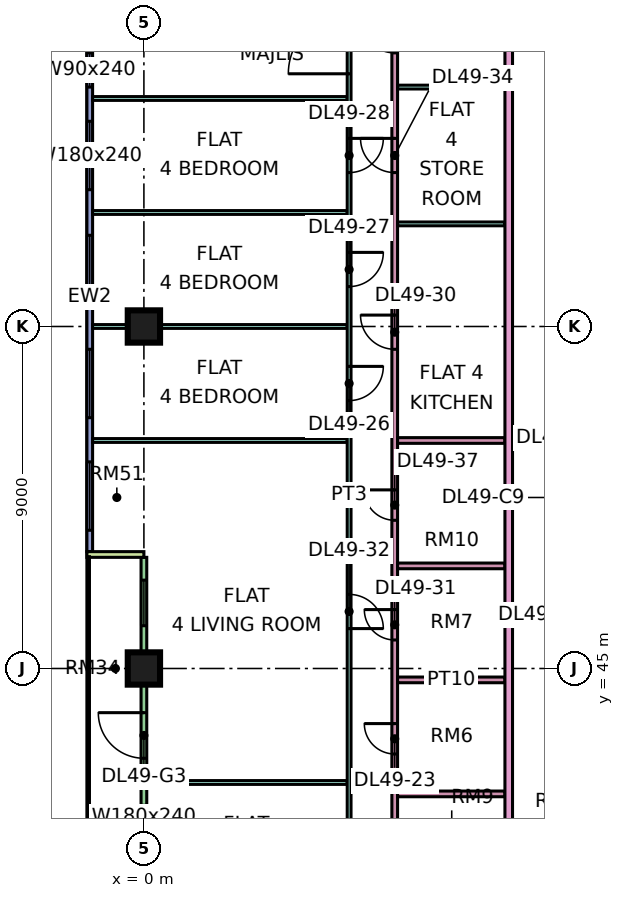
"""IFC4 building model, lengths in metres.
Left out: names, types, materials, properties, quantities, classifications, styles, units other than length and angle.
Written with IfcOpenShell. Run it as: python <this file> out.ifc"""

import sys

from ifc_helpers import new_model, si_unit, direction, frame, frame_2d, origin, origin_2d, place, context, subcontext, project, spatial, rectangle, extrude, element, fill, save


model = new_model("IFC4")
c1 = context("Model", 3, precision=1e-05, world=origin(), true_north=direction((0.0, 1.0)))
c2 = subcontext(c1, "Body", "Model", "MODEL_VIEW")
j1 = project(units=[si_unit("LENGTHUNIT", "METRE"), si_unit("PLANEANGLEUNIT", "RADIAN")], contexts=[c1])
p1 = place(None, origin())
s1 = spatial("IfcSite", under=j1, at=p1, CompositionType="ELEMENT")
p2 = place(p1, origin())
s2 = spatial("IfcBuilding", under=s1, at=p2, CompositionType="ELEMENT")
p3 = place(p2, frame((0.0, 0.0, 211.65)))
s3 = spatial("IfcBuildingStorey", under=s2, at=p3, CompositionType="ELEMENT", Elevation=211.65)
for number, where, z_axis, x_axis in (
    (1, (0.0, 45.0, 0.0), (0.0, 0.0, 1.0), (1.0, 0.0, 0.0)),
    (2, (0.0, 54.0, 0.0), (0.0, 0.0, 1.0), (1.0, 0.0, 0.0)),
):
    element("IfcColumn", number, at=place(p3, frame(where, z_axis=z_axis, x_axis=x_axis)), inside=s3, PredefinedType="COLUMN", context=c2, shape_type="SweptSolid", body=[
        extrude(rectangle(XDim=0.85, YDim=0.85, at=origin_2d()), origin(), (0.0, 0.0, 1.0), 3.75),
    ])
p4 = place(p3, frame((-1.425, 61.5, 0.0), z_axis=(0.0, 0.0, 1.0), x_axis=(0.0, -1.0, 0.0)))
e3 = element("IfcWall", 3, at=p4, inside=s3, PredefinedType="SOLIDWALL", context=c2, shape_type="SweptSolid", body=[
    extrude(rectangle(XDim=13.425, YDim=0.15, at=frame_2d((6.712, 0.0))), origin(), (0.0, 0.0, 1.0), 3.35),
])
p5 = place(p4, frame((0.3, 0.0, 0.45)))
e4 = element("IfcOpeningElement", 4, at=p5, cuts=e3, PredefinedType="OPENING", context=c2, shape_type="SweptSolid", body=[
    extrude(rectangle(XDim=0.9, YDim=2.4, at=frame_2d((0.45, 1.2))), frame((0.0, 0.085, 0.0), z_axis=(0.0, -1.0, 0.0), x_axis=(1.0, 0.0, 0.0)), (0.0, 0.0, 1.0), 0.17),
])
p6 = place(p4, frame((2.1, 0.0, 0.45)))
e5 = element("IfcOpeningElement", 5, at=p6, cuts=e3, PredefinedType="OPENING", context=c2, shape_type="SweptSolid", body=[
    extrude(rectangle(XDim=1.8, YDim=2.4, at=frame_2d((0.9, 1.2))), frame((0.0, 0.085, 0.0), z_axis=(0.0, -1.0, 0.0), x_axis=(1.0, 0.0, 0.0)), (0.0, 0.0, 1.0), 0.17),
])
p7 = place(p4, frame((5.1, 0.0, 0.45)))
e6 = element("IfcOpeningElement", 6, at=p7, cuts=e3, PredefinedType="OPENING", context=c2, shape_type="SweptSolid", body=[
    extrude(rectangle(XDim=1.8, YDim=2.4, at=frame_2d((0.9, 1.2))), frame((0.0, 0.085, 0.0), z_axis=(0.0, -1.0, 0.0), x_axis=(1.0, 0.0, 0.0)), (0.0, 0.0, 1.0), 0.17),
])
p8 = place(p4, frame((8.1, 0.0, 0.45)))
e7 = element("IfcOpeningElement", 7, at=p8, cuts=e3, PredefinedType="OPENING", context=c2, shape_type="SweptSolid", body=[
    extrude(rectangle(XDim=1.8, YDim=2.4, at=frame_2d((0.9, 1.2))), frame((0.0, 0.085, 0.0), z_axis=(0.0, -1.0, 0.0), x_axis=(1.0, 0.0, 0.0)), (0.0, 0.0, 1.0), 0.17),
])
p9 = place(p4, frame((11.062, 0.0, 0.45)))
e8 = element("IfcOpeningElement", 8, at=p9, cuts=e3, PredefinedType="OPENING", context=c2, shape_type="SweptSolid", body=[
    extrude(rectangle(XDim=1.8, YDim=2.4, at=frame_2d((0.9, 1.2))), frame((0.0, 0.085, 0.0), z_axis=(0.0, -1.0, 0.0), x_axis=(1.0, 0.0, 0.0)), (0.0, 0.0, 1.0), 0.17),
])
p10 = place(p3, frame((0.0, 47.925, 0.0), z_axis=(0.0, 0.0, 1.0), x_axis=(0.0, -1.0, 0.0)))
e9 = element("IfcWall", 9, at=p10, inside=s3, PredefinedType="SOLIDWALL", context=c2, shape_type="SweptSolid", body=[
    extrude(rectangle(XDim=11.85, YDim=0.15, at=frame_2d((5.925, 0.0))), origin(), (0.0, 0.0, 1.0), 3.35),
])
p11 = place(p10, frame((0.6, 0.0, 0.45)))
e10 = element("IfcOpeningElement", 10, at=p11, cuts=e9, PredefinedType="OPENING", context=c2, shape_type="SweptSolid", body=[
    extrude(rectangle(XDim=1.2, YDim=2.4, at=frame_2d((0.6, 1.2))), frame((0.0, 0.085, 0.0), z_axis=(0.0, -1.0, 0.0), x_axis=(1.0, 0.0, 0.0)), (0.0, 0.0, 1.0), 0.17),
])
p12 = place(p10, frame((4.087, 0.0, 0.0)))
e11 = element("IfcOpeningElement", 11, at=p12, cuts=e9, PredefinedType="OPENING", context=c2, shape_type="SweptSolid", body=[
    extrude(rectangle(XDim=1.2, YDim=2.4, at=frame_2d((0.6, 1.2))), frame((0.0, 0.085, 0.0), z_axis=(0.0, -1.0, 0.0), x_axis=(1.0, 0.0, 0.0)), (0.0, 0.0, 1.0), 0.17),
])
p13 = place(p10, frame((6.525, 0.0, 0.45)))
e12 = element("IfcOpeningElement", 12, at=p13, cuts=e9, PredefinedType="OPENING", context=c2, shape_type="SweptSolid", body=[
    extrude(rectangle(XDim=1.8, YDim=2.4, at=frame_2d((0.9, 1.2))), frame((0.0, 0.085, 0.0), z_axis=(0.0, -1.0, 0.0), x_axis=(1.0, 0.0, 0.0)), (0.0, 0.0, 1.0), 0.17),
])
p14 = place(p10, frame((9.562, 0.0, 0.45)))
e13 = element("IfcOpeningElement", 13, at=p14, cuts=e9, PredefinedType="OPENING", context=c2, shape_type="SweptSolid", body=[
    extrude(rectangle(XDim=1.2, YDim=2.4, at=frame_2d((0.6, 1.2))), frame((0.0, 0.085, 0.0), z_axis=(0.0, -1.0, 0.0), x_axis=(1.0, 0.0, 0.0)), (0.0, 0.0, 1.0), 0.17),
])
p15 = place(p3, frame((-1.5, 48.0, 0.0), z_axis=(0.0, 0.0, 1.0), x_axis=(1.0, 0.0, 0.0)))
e14 = element("IfcWall", 14, at=p15, inside=s3, PredefinedType="SOLIDWALL", context=c2, shape_type="SweptSolid", body=[
    extrude(rectangle(XDim=1.5, YDim=0.15, at=frame_2d((0.75, 0.0))), origin(), (0.0, 0.0, 1.0), 3.35),
])
for number, where, z_axis, x_axis in (
    (15, (-1.351, 54.0, 0.0), (0.0, 0.0, 1.0), (1.0, 0.0, 0.0)),
    (16, (-1.351, 57.0, 0.0), (0.0, 0.0, 1.0), (1.0, 0.0, 0.0)),
    (17, (-1.351, 60.0, 0.0), (0.0, 0.0, 1.0), (1.0, 0.0, 0.0)),
):
    element("IfcWall", number, at=place(p3, frame(where, z_axis=z_axis, x_axis=x_axis)), inside=s3, PredefinedType="PARTITIONING", context=c2, shape_type="SweptSolid", body=[
        extrude(rectangle(XDim=6.701, YDim=0.1, at=frame_2d((3.351, 0.0))), origin(), (0.0, 0.0, 1.0), 3.35),
    ])
p16 = place(p3, frame((-1.35, 51.0, 0.0), z_axis=(0.0, 0.0, 1.0), x_axis=(1.0, 0.0, 0.0)))
e18 = element("IfcWall", 18, at=p16, inside=s3, PredefinedType="PARTITIONING", context=c2, shape_type="SweptSolid", body=[
    extrude(rectangle(XDim=6.7, YDim=0.1, at=frame_2d((3.35, 0.0))), origin(), (0.0, 0.0, 1.0), 3.35),
])
p17 = place(p3, frame((0.074, 42.0, 0.0), z_axis=(0.0, 0.0, 1.0), x_axis=(1.0, 0.0, 0.0)))
e19 = element("IfcWall", 19, at=p17, inside=s3, PredefinedType="PARTITIONING", context=c2, shape_type="SweptSolid", body=[
    extrude(rectangle(XDim=5.276, YDim=0.1, at=frame_2d((2.638, 0.0))), origin(), (0.0, 0.0, 1.0), 3.35),
])
p18 = place(p3, frame((5.4, 36.1, 0.0), z_axis=(0.0, 0.0, 1.0), x_axis=(0.0, 1.0, 0.0)))
e20 = element("IfcWall", 20, at=p18, inside=s3, PredefinedType="PARTITIONING", context=c2, shape_type="SweptSolid", body=[
    extrude(rectangle(XDim=26.95, YDim=0.1, at=frame_2d((13.475, 0.0))), origin(), (0.0, 0.0, 1.0), 3.35),
])
p19 = place(p18, frame((0.95, 0.0, 0.0)))
e21 = element("IfcOpeningElement", 21, at=p19, cuts=e20, PredefinedType="OPENING", context=c2, shape_type="SweptSolid", body=[
    extrude(rectangle(XDim=0.9, YDim=2.1, at=frame_2d((0.45, 1.05))), frame((0.0, 0.06, 0.0), z_axis=(0.0, -1.0, 0.0), x_axis=(1.0, 0.0, 0.0)), (0.0, 0.0, 1.0), 0.12),
])
p20 = place(p18, frame((3.95, 0.0, 0.0)))
e22 = element("IfcOpeningElement", 22, at=p20, cuts=e20, PredefinedType="OPENING", context=c2, shape_type="SweptSolid", body=[
    extrude(rectangle(XDim=0.9, YDim=2.1, at=frame_2d((0.45, 1.05))), frame((0.0, 0.06, 0.0), z_axis=(0.0, -1.0, 0.0), x_axis=(1.0, 0.0, 0.0)), (0.0, 0.0, 1.0), 0.12),
])
p21 = place(p18, frame((15.95, 0.0, 0.0)))
e23 = element("IfcOpeningElement", 23, at=p21, cuts=e20, PredefinedType="OPENING", context=c2, shape_type="SweptSolid", body=[
    extrude(rectangle(XDim=0.9, YDim=2.1, at=frame_2d((0.45, 1.05))), frame((0.0, 0.06, 0.0), z_axis=(0.0, -1.0, 0.0), x_axis=(1.0, 0.0, 0.0)), (0.0, 0.0, 1.0), 0.12),
])
p22 = place(p18, frame((18.95, 0.0, 0.0)))
e24 = element("IfcOpeningElement", 24, at=p22, cuts=e20, PredefinedType="OPENING", context=c2, shape_type="SweptSolid", body=[
    extrude(rectangle(XDim=0.9, YDim=2.1, at=frame_2d((0.45, 1.05))), frame((0.0, 0.06, 0.0), z_axis=(0.0, -1.0, 0.0), x_axis=(1.0, 0.0, 0.0)), (0.0, 0.0, 1.0), 0.12),
])
p23 = place(p18, frame((21.95, 0.0, 0.0)))
e25 = element("IfcOpeningElement", 25, at=p23, cuts=e20, PredefinedType="OPENING", context=c2, shape_type="SweptSolid", body=[
    extrude(rectangle(XDim=0.9, YDim=2.1, at=frame_2d((0.45, 1.05))), frame((0.0, 0.06, 0.0), z_axis=(0.0, -1.0, 0.0), x_axis=(1.0, 0.0, 0.0)), (0.0, 0.0, 1.0), 0.12),
])
p24 = place(p18, frame((9.95, 0.0, 0.0)))
e26 = element("IfcOpeningElement", 26, at=p24, cuts=e20, PredefinedType="OPENING", context=c2, shape_type="SweptSolid", body=[
    extrude(rectangle(XDim=0.9, YDim=2.1, at=frame_2d((0.45, 1.05))), frame((0.0, 0.06, 0.0), z_axis=(0.0, -1.0, 0.0), x_axis=(1.0, 0.0, 0.0)), (0.0, 0.0, 1.0), 0.12),
])
p25 = place(p18, frame((24.55, 0.0, 0.0)))
e27 = element("IfcOpeningElement", 27, at=p25, cuts=e20, PredefinedType="OPENING", context=c2, shape_type="SweptSolid", body=[
    extrude(rectangle(XDim=1.6, YDim=2.1, at=frame_2d((0.8, 1.05))), frame((0.0, 0.06, 0.0), z_axis=(0.0, -1.0, 0.0), x_axis=(1.0, 0.0, 0.0)), (0.0, 0.0, 1.0), 0.12),
])
p26 = place(p3, frame((6.6, 39.525, 0.0), z_axis=(0.0, 0.0, 1.0), x_axis=(0.0, 1.0, 0.0)))
e28 = element("IfcWall", 28, at=p26, inside=s3, PredefinedType="PARTITIONING", context=c2, shape_type="SweptSolid", body=[
    extrude(rectangle(XDim=24.825, YDim=0.15, at=frame_2d((12.413, 0.0))), origin(), (0.0, 0.0, 1.0), 3.35),
])
p27 = place(p26, frame((3.225, 0.0, 0.0)))
e29 = element("IfcOpeningElement", 29, at=p27, cuts=e28, PredefinedType="OPENING", context=c2, shape_type="SweptSolid", body=[
    extrude(rectangle(XDim=0.8, YDim=2.1, at=frame_2d((0.4, 1.05))), frame((0.0, 0.085, 0.0), z_axis=(0.0, -1.0, 0.0), x_axis=(1.0, 0.0, 0.0)), (0.0, 0.0, 1.0), 0.17),
])
p28 = place(p26, frame((13.875, 0.0, 0.0)))
e30 = element("IfcOpeningElement", 30, at=p28, cuts=e28, PredefinedType="OPENING", context=c2, shape_type="SweptSolid", body=[
    extrude(rectangle(XDim=0.9, YDim=2.1, at=frame_2d((0.45, 1.05))), frame((0.0, 0.085, 0.0), z_axis=(0.0, -1.0, 0.0), x_axis=(1.0, 0.0, 0.0)), (0.0, 0.0, 1.0), 0.17),
])
p29 = place(p26, frame((6.225, 0.0, 0.0)))
e31 = element("IfcOpeningElement", 31, at=p29, cuts=e28, PredefinedType="OPENING", context=c2, shape_type="SweptSolid", body=[
    extrude(rectangle(XDim=0.8, YDim=2.1, at=frame_2d((0.4, 1.05))), frame((0.0, 0.085, 0.0), z_axis=(0.0, -1.0, 0.0), x_axis=(1.0, 0.0, 0.0)), (0.0, 0.0, 1.0), 0.17),
])
p30 = place(p26, frame((18.525, 0.0, 0.0)))
e32 = element("IfcOpeningElement", 32, at=p30, cuts=e28, PredefinedType="OPENING", context=c2, shape_type="SweptSolid", body=[
    extrude(rectangle(XDim=0.9, YDim=2.1, at=frame_2d((0.45, 1.05))), frame((0.0, 0.085, 0.0), z_axis=(0.0, -1.0, 0.0), x_axis=(1.0, 0.0, 0.0)), (0.0, 0.0, 1.0), 0.17),
])
p31 = place(p26, frame((21.675, 0.0, 0.0)))
e33 = element("IfcOpeningElement", 33, at=p31, cuts=e28, PredefinedType="OPENING", context=c2, shape_type="SweptSolid", body=[
    extrude(rectangle(XDim=0.9, YDim=2.1, at=frame_2d((0.45, 1.05))), frame((0.0, 0.085, 0.0), z_axis=(0.0, -1.0, 0.0), x_axis=(1.0, 0.0, 0.0)), (0.0, 0.0, 1.0), 0.17),
])
p32 = place(p26, frame((9.375, 0.0, 0.0)))
e34 = element("IfcOpeningElement", 34, at=p32, cuts=e28, PredefinedType="OPENING", context=c2, shape_type="SweptSolid", body=[
    extrude(rectangle(XDim=0.8, YDim=2.1, at=frame_2d((0.4, 1.05))), frame((0.0, 0.085, 0.0), z_axis=(0.0, -1.0, 0.0), x_axis=(1.0, 0.0, 0.0)), (0.0, 0.0, 1.0), 0.17),
])
for number, where, z_axis, x_axis in (
    (35, (6.675, 41.7, 0.0), (0.0, 0.0, 1.0), (1.0, 0.0, 0.0)),
    (36, (6.675, 44.7, 0.0), (0.0, 0.0, 1.0), (1.0, 0.0, 0.0)),
    (37, (6.675, 47.7, 0.0), (0.0, 0.0, 1.0), (1.0, 0.0, 0.0)),
    (38, (6.675, 51.0, 0.0), (0.0, 0.0, 1.0), (1.0, 0.0, 0.0)),
):
    element("IfcWall", number, at=place(p3, frame(where, z_axis=z_axis, x_axis=x_axis)), inside=s3, PredefinedType="PARTITIONING", context=c2, shape_type="SweptSolid", body=[
        extrude(rectangle(XDim=2.825, YDim=0.15, at=frame_2d((1.413, 0.0))), origin(), (0.0, 0.0, 1.0), 3.35),
    ])
for number, where, z_axis, x_axis in (
    (39, (6.675, 56.7, 0.0), (0.0, 0.0, 1.0), (1.0, 0.0, 0.0)),
    (40, (6.675, 60.3, 0.0), (0.0, 0.0, 1.0), (1.0, 0.0, 0.0)),
):
    element("IfcWall", number, at=place(p3, frame(where, z_axis=z_axis, x_axis=x_axis)), inside=s3, PredefinedType="PARTITIONING", context=c2, shape_type="SweptSolid", body=[
        extrude(rectangle(XDim=2.825, YDim=0.1, at=frame_2d((1.413, 0.0))), origin(), (0.0, 0.0, 1.0), 3.35),
    ])
p33 = place(p3, frame((9.6, 20.0, 0.0), z_axis=(0.0, 0.0, 1.0), x_axis=(0.0, 1.0, 0.0)))
e41 = element("IfcWall", 41, at=p33, inside=s3, PredefinedType="PARTITIONING", context=c2, shape_type="SweptSolid", body=[
    extrude(rectangle(XDim=44.35, YDim=0.2, at=frame_2d((22.175, 0.0))), origin(), (0.0, 0.0, 1.0), 3.35),
])
p34 = place(p33, frame((17.25, 0.0, 0.0)))
e42 = element("IfcOpeningElement", 42, at=p34, cuts=e41, PredefinedType="OPENING", context=c2, shape_type="SweptSolid", body=[
    extrude(rectangle(XDim=1.0, YDim=2.1, at=frame_2d((0.5, 1.05))), frame((0.0, 0.11, 0.0), z_axis=(0.0, -1.0, 0.0), x_axis=(1.0, 0.0, 0.0)), (0.0, 0.0, 1.0), 0.22),
])
p35 = place(p33, frame((0.6, 0.0, 0.0)))
e43 = element("IfcOpeningElement", 43, at=p35, cuts=e41, PredefinedType="OPENING", context=c2, shape_type="SweptSolid", body=[
    extrude(rectangle(XDim=1.2, YDim=2.1, at=frame_2d((0.6, 1.05))), frame((0.0, 0.11, 0.0), z_axis=(0.0, -1.0, 0.0), x_axis=(1.0, 0.0, 0.0)), (0.0, 0.0, 1.0), 0.22),
])
p36 = place(p33, frame((4.35, 0.0, 0.0)))
e44 = element("IfcOpeningElement", 44, at=p36, cuts=e41, PredefinedType="OPENING", context=c2, shape_type="SweptSolid", body=[
    extrude(rectangle(XDim=1.0, YDim=2.1, at=frame_2d((0.5, 1.05))), frame((0.0, 0.11, 0.0), z_axis=(0.0, -1.0, 0.0), x_axis=(1.0, 0.0, 0.0)), (0.0, 0.0, 1.0), 0.22),
])
p37 = place(p5, origin())
e45 = element("IfcWindow", 45, at=p37, inside=s3, PartitioningType="SINGLE_PANEL", PredefinedType="WINDOW", context=c2, shape_type="SweptSolid", body=[
    extrude(rectangle(XDim=0.9, YDim=2.4, at=frame_2d((0.45, 1.2))), frame((0.0, 0.03, 0.0), z_axis=(0.0, -1.0, 0.0), x_axis=(1.0, 0.0, 0.0)), (0.0, 0.0, 1.0), 0.06),
])
fill(e4, e45)
p38 = place(p6, origin())
e46 = element("IfcWindow", 46, at=p38, inside=s3, PartitioningType="SINGLE_PANEL", PredefinedType="WINDOW", context=c2, shape_type="SweptSolid", body=[
    extrude(rectangle(XDim=1.8, YDim=2.4, at=frame_2d((0.9, 1.2))), frame((0.0, 0.03, 0.0), z_axis=(0.0, -1.0, 0.0), x_axis=(1.0, 0.0, 0.0)), (0.0, 0.0, 1.0), 0.06),
])
fill(e5, e46)
p39 = place(p7, origin())
e47 = element("IfcWindow", 47, at=p39, inside=s3, PartitioningType="SINGLE_PANEL", PredefinedType="WINDOW", context=c2, shape_type="SweptSolid", body=[
    extrude(rectangle(XDim=1.8, YDim=2.4, at=frame_2d((0.9, 1.2))), frame((0.0, 0.03, 0.0), z_axis=(0.0, -1.0, 0.0), x_axis=(1.0, 0.0, 0.0)), (0.0, 0.0, 1.0), 0.06),
])
fill(e6, e47)
p40 = place(p8, origin())
e48 = element("IfcWindow", 48, at=p40, inside=s3, PartitioningType="SINGLE_PANEL", PredefinedType="WINDOW", context=c2, shape_type="SweptSolid", body=[
    extrude(rectangle(XDim=1.8, YDim=2.4, at=frame_2d((0.9, 1.2))), frame((0.0, 0.03, 0.0), z_axis=(0.0, -1.0, 0.0), x_axis=(1.0, 0.0, 0.0)), (0.0, 0.0, 1.0), 0.06),
])
fill(e7, e48)
p41 = place(p9, origin())
e49 = element("IfcWindow", 49, at=p41, inside=s3, PartitioningType="SINGLE_PANEL", PredefinedType="WINDOW", context=c2, shape_type="SweptSolid", body=[
    extrude(rectangle(XDim=1.8, YDim=2.4, at=frame_2d((0.9, 1.2))), frame((0.0, 0.03, 0.0), z_axis=(0.0, -1.0, 0.0), x_axis=(1.0, 0.0, 0.0)), (0.0, 0.0, 1.0), 0.06),
])
fill(e8, e49)
p42 = place(p11, origin())
e50 = element("IfcWindow", 50, at=p42, inside=s3, PartitioningType="SINGLE_PANEL", PredefinedType="WINDOW", context=c2, shape_type="SweptSolid", body=[
    extrude(rectangle(XDim=1.2, YDim=2.4, at=frame_2d((0.6, 1.2))), frame((0.0, 0.03, 0.0), z_axis=(0.0, -1.0, 0.0), x_axis=(1.0, 0.0, 0.0)), (0.0, 0.0, 1.0), 0.06),
])
fill(e10, e50)
p43 = place(p12, frame((1.2, 0.0, 0.0), z_axis=(0.0, 0.0, 1.0), x_axis=(-1.0, 0.0, 0.0)))
e51 = element("IfcDoor", 51, at=p43, inside=s3, OperationType="DOUBLE_DOOR_SINGLE_SWING", PredefinedType="DOOR", context=c2, shape_type="SweptSolid", body=[
    extrude(rectangle(XDim=1.2, YDim=2.4, at=frame_2d((0.6, 1.2))), frame((0.0, 0.025, 0.0), z_axis=(0.0, -1.0, 0.0), x_axis=(1.0, 0.0, 0.0)), (0.0, 0.0, 1.0), 0.05),
])
fill(e11, e51)
p44 = place(p13, origin())
e52 = element("IfcWindow", 52, at=p44, inside=s3, PartitioningType="SINGLE_PANEL", PredefinedType="WINDOW", context=c2, shape_type="SweptSolid", body=[
    extrude(rectangle(XDim=1.8, YDim=2.4, at=frame_2d((0.9, 1.2))), frame((0.0, 0.03, 0.0), z_axis=(0.0, -1.0, 0.0), x_axis=(1.0, 0.0, 0.0)), (0.0, 0.0, 1.0), 0.06),
])
fill(e12, e52)
p45 = place(p27, frame((0.8, 0.0, 0.0), z_axis=(0.0, 0.0, 1.0), x_axis=(-1.0, 0.0, 0.0)))
e53 = element("IfcDoor", 53, at=p45, inside=s3, OperationType="SINGLE_SWING_RIGHT", PredefinedType="DOOR", context=c2, shape_type="SweptSolid", body=[
    extrude(rectangle(XDim=0.8, YDim=2.1, at=frame_2d((0.4, 1.05))), frame((0.0, 0.025, 0.0), z_axis=(0.0, -1.0, 0.0), x_axis=(1.0, 0.0, 0.0)), (0.0, 0.0, 1.0), 0.05),
])
fill(e29, e53)
p46 = place(p21, origin())
e54 = element("IfcDoor", 54, at=p46, inside=s3, OperationType="SINGLE_SWING_RIGHT", PredefinedType="DOOR", context=c2, shape_type="SweptSolid", body=[
    extrude(rectangle(XDim=0.9, YDim=2.1, at=frame_2d((0.45, 1.05))), frame((0.0, 0.025, 0.0), z_axis=(0.0, -1.0, 0.0), x_axis=(1.0, 0.0, 0.0)), (0.0, 0.0, 1.0), 0.05),
])
fill(e23, e54)
p47 = place(p22, origin())
e55 = element("IfcDoor", 55, at=p47, inside=s3, OperationType="SINGLE_SWING_RIGHT", PredefinedType="DOOR", context=c2, shape_type="SweptSolid", body=[
    extrude(rectangle(XDim=0.9, YDim=2.1, at=frame_2d((0.45, 1.05))), frame((0.0, 0.025, 0.0), z_axis=(0.0, -1.0, 0.0), x_axis=(1.0, 0.0, 0.0)), (0.0, 0.0, 1.0), 0.05),
])
fill(e24, e55)
p48 = place(p23, origin())
e56 = element("IfcDoor", 56, at=p48, inside=s3, OperationType="SINGLE_SWING_RIGHT", PredefinedType="DOOR", context=c2, shape_type="SweptSolid", body=[
    extrude(rectangle(XDim=0.9, YDim=2.1, at=frame_2d((0.45, 1.05))), frame((0.0, 0.025, 0.0), z_axis=(0.0, -1.0, 0.0), x_axis=(1.0, 0.0, 0.0)), (0.0, 0.0, 1.0), 0.05),
])
fill(e25, e56)
p49 = place(p28, frame((0.9, 0.0, 0.0), z_axis=(0.0, 0.0, 1.0), x_axis=(-1.0, 0.0, 0.0)))
e57 = element("IfcDoor", 57, at=p49, inside=s3, OperationType="SINGLE_SWING_RIGHT", PredefinedType="DOOR", context=c2, shape_type="SweptSolid", body=[
    extrude(rectangle(XDim=0.9, YDim=2.1, at=frame_2d((0.45, 1.05))), frame((0.0, 0.025, 0.0), z_axis=(0.0, -1.0, 0.0), x_axis=(1.0, 0.0, 0.0)), (0.0, 0.0, 1.0), 0.05),
])
fill(e30, e57)
p50 = place(p29, frame((0.8, 0.0, 0.0), z_axis=(0.0, 0.0, 1.0), x_axis=(-1.0, 0.0, 0.0)))
e58 = element("IfcDoor", 58, at=p50, inside=s3, OperationType="SINGLE_SWING_RIGHT", PredefinedType="DOOR", context=c2, shape_type="SweptSolid", body=[
    extrude(rectangle(XDim=0.8, YDim=2.1, at=frame_2d((0.4, 1.05))), frame((0.0, 0.025, 0.0), z_axis=(0.0, -1.0, 0.0), x_axis=(1.0, 0.0, 0.0)), (0.0, 0.0, 1.0), 0.05),
])
fill(e31, e58)
p51 = place(p24, frame((0.9, 0.0, 0.0), z_axis=(0.0, 0.0, 1.0), x_axis=(-1.0, 0.0, 0.0)))
e59 = element("IfcDoor", 59, at=p51, inside=s3, OperationType="SINGLE_SWING_LEFT", PredefinedType="DOOR", context=c2, shape_type="SweptSolid", body=[
    extrude(rectangle(XDim=0.9, YDim=2.1, at=frame_2d((0.45, 1.05))), frame((0.0, 0.025, 0.0), z_axis=(0.0, -1.0, 0.0), x_axis=(1.0, 0.0, 0.0)), (0.0, 0.0, 1.0), 0.05),
])
fill(e26, e59)
p52 = place(p25, origin())
e60 = element("IfcDoor", 60, at=p52, inside=s3, OperationType="DOUBLE_DOOR_SINGLE_SWING", PredefinedType="DOOR", context=c2, shape_type="SweptSolid", body=[
    extrude(rectangle(XDim=1.6, YDim=2.1, at=frame_2d((0.8, 1.05))), frame((0.0, 0.025, 0.0), z_axis=(0.0, -1.0, 0.0), x_axis=(1.0, 0.0, 0.0)), (0.0, 0.0, 1.0), 0.05),
])
fill(e27, e60)
p53 = place(p30, frame((0.9, 0.0, 0.0), z_axis=(0.0, 0.0, 1.0), x_axis=(-1.0, 0.0, 0.0)))
e61 = element("IfcDoor", 61, at=p53, inside=s3, OperationType="SINGLE_SWING_RIGHT", PredefinedType="DOOR", context=c2, shape_type="SweptSolid", body=[
    extrude(rectangle(XDim=0.9, YDim=2.1, at=frame_2d((0.45, 1.05))), frame((0.0, 0.025, 0.0), z_axis=(0.0, -1.0, 0.0), x_axis=(1.0, 0.0, 0.0)), (0.0, 0.0, 1.0), 0.05),
])
fill(e32, e61)
p54 = place(p31, frame((0.9, 0.0, 0.0), z_axis=(0.0, 0.0, 1.0), x_axis=(-1.0, 0.0, 0.0)))
e62 = element("IfcDoor", 62, at=p54, inside=s3, OperationType="SINGLE_SWING_RIGHT", PredefinedType="DOOR", context=c2, shape_type="SweptSolid", body=[
    extrude(rectangle(XDim=0.9, YDim=2.1, at=frame_2d((0.45, 1.05))), frame((0.0, 0.025, 0.0), z_axis=(0.0, -1.0, 0.0), x_axis=(1.0, 0.0, 0.0)), (0.0, 0.0, 1.0), 0.05),
])
fill(e33, e62)
p55 = place(p32, frame((0.8, 0.0, 0.0), z_axis=(0.0, 0.0, 1.0), x_axis=(-1.0, 0.0, 0.0)))
e63 = element("IfcDoor", 63, at=p55, inside=s3, OperationType="SINGLE_SWING_RIGHT", PredefinedType="DOOR", context=c2, shape_type="SweptSolid", body=[
    extrude(rectangle(XDim=0.8, YDim=2.1, at=frame_2d((0.4, 1.05))), frame((0.0, 0.025, 0.0), z_axis=(0.0, -1.0, 0.0), x_axis=(1.0, 0.0, 0.0)), (0.0, 0.0, 1.0), 0.05),
])
fill(e34, e63)
save(model, sys.argv[1])
